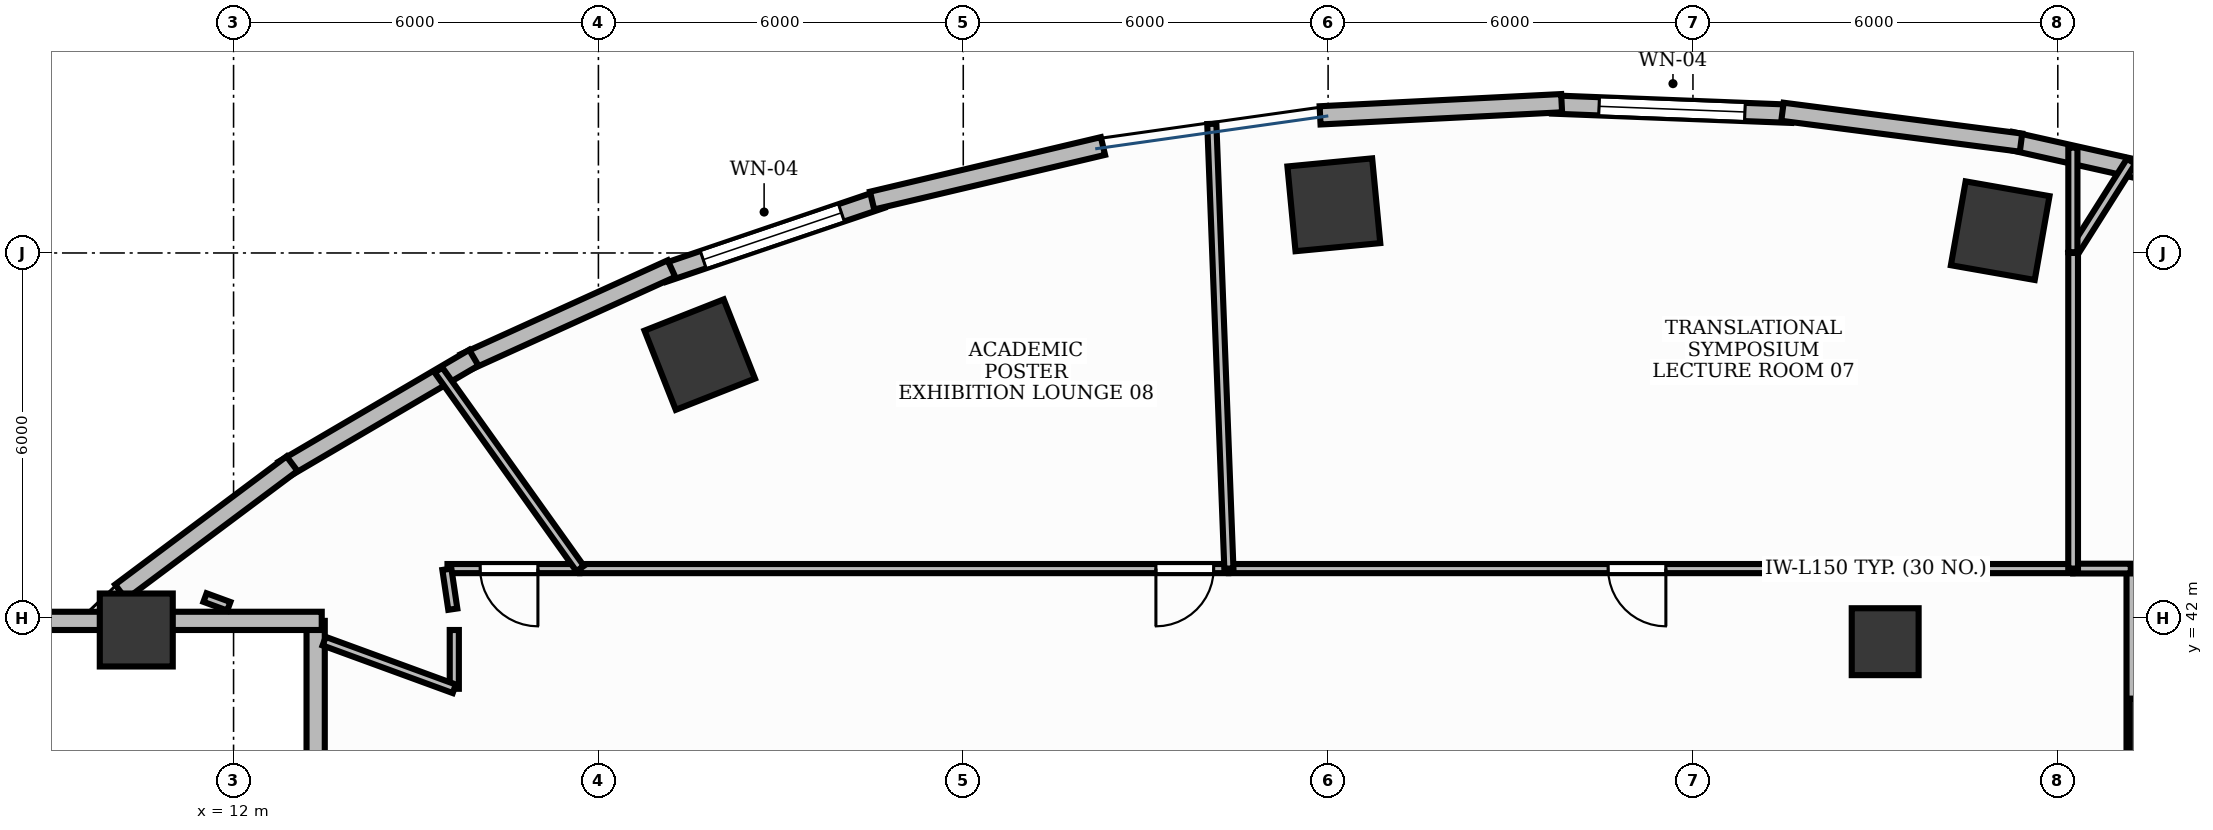
"""IFC4 building model, lengths in metres.
Left out: names, types, materials, properties, quantities, classifications, styles, units other than length and angle.
Written with IfcOpenShell. Run it as: python <this file> out.ifc"""

import sys

from ifc_helpers import new_model, si_unit, direction, frame, frame_2d, origin, origin_2d, place, context, subcontext, project, spatial, rectangle, extrude, element, fill, save


model = new_model("IFC4")
c1 = context("Model", 3, precision=1e-05, world=origin(), true_north=direction((0.0, 1.0)))
c2 = subcontext(c1, "Body", "Model", "MODEL_VIEW")
j1 = project(units=[si_unit("LENGTHUNIT", "METRE"), si_unit("PLANEANGLEUNIT", "RADIAN")], contexts=[c1])
p1 = place(None, origin())
s1 = spatial("IfcSite", under=j1, at=p1, CompositionType="ELEMENT")
p2 = place(p1, origin())
s2 = spatial("IfcBuilding", under=s1, at=p2, CompositionType="ELEMENT")
p3 = place(p2, frame((0.0, 0.0, 15.0)))
s3 = spatial("IfcBuildingStorey", under=s2, at=p3, CompositionType="ELEMENT", Elevation=15.0)
p4 = place(p3, frame((10.4, 41.8, -0.35), z_axis=(0.0, 0.0, 1.0), x_axis=(1.0, 0.0, 0.0)))
e1 = element("IfcColumn", 1, at=p4, inside=s3, PredefinedType="COLUMN", context=c2, shape_type="SweptSolid", body=[
    extrude(rectangle(XDim=1.2, YDim=1.2, at=origin_2d()), origin(), (0.0, 0.0, 1.0), 3.8),
])
p5 = place(p3, frame((43.727, 40.121, -0.0), z_axis=(0.0, 0.0, 1.0), x_axis=(1.0, 0.0, 0.0)))
e2 = element("IfcColumn", 2, at=p5, inside=s3, PredefinedType="COLUMN", context=c2, shape_type="SweptSolid", body=[
    extrude(rectangle(XDim=1.1, YDim=1.1, at=origin_2d()), origin(), (0.0, 0.0, 1.0), 5.051),
])
p6 = place(p3, frame((41.052, 48.367, -0.0), z_axis=(0.0, 0.0, 1.0), x_axis=(-0.984868307662, 0.173304404339, 0.0)))
e3 = element("IfcColumn", 3, at=p6, inside=s3, PredefinedType="COLUMN", context=c2, shape_type="SweptSolid", body=[
    extrude(rectangle(XDim=1.4, YDim=1.4, at=origin_2d()), origin(), (0.0, 0.0, 1.0), 5.051),
])
p7 = place(p3, frame((39.161, 41.608, -0.0), z_axis=(0.0, 0.0, 1.0), x_axis=(1.0, 0.0, 0.0)))
e4 = element("IfcColumn", 4, at=p7, inside=s3, PredefinedType="COLUMN", context=c2, shape_type="SweptSolid", body=[
    extrude(rectangle(XDim=1.1, YDim=1.1, at=origin_2d()), origin(), (0.0, 0.0, 1.0), 5.051),
])
for number, where, z_axis, x_axis in (
    (5, (30.094, 48.792, -0.0), (0.0, 0.0, 1.0), (0.995, 0.095, 0.0)),
    (6, (19.667, 46.329, -0.0), (0.0, 0.0, 1.0), (0.93, 0.367, 0.0)),
):
    element("IfcColumn", number, at=place(p3, frame(where, z_axis=z_axis, x_axis=x_axis)), inside=s3, PredefinedType="COLUMN", context=c2, shape_type="SweptSolid", body=[
        extrude(rectangle(XDim=1.4, YDim=1.4, at=origin_2d()), origin(), (0.0, 0.0, 1.0), 5.051),
    ])
p8 = place(p3, frame((37.623, 50.289, 0.0), z_axis=(0.0, 0.0, 1.0), x_axis=(-0.999247008469, 0.038799691558, 0.0)))
e7 = element("IfcWall", 7, at=p8, inside=s3, PredefinedType="STANDARD", context=c2, shape_type="SweptSolid", body=[
    extrude(rectangle(XDim=3.939, YDim=0.3, at=frame_2d((1.969, 0.0))), origin(), (0.0, 0.0, 1.0), 5.05),
])
p9 = place(p8, frame((0.769, 0.0, 1.5)))
e8 = element("IfcOpeningElement", 8, at=p9, cuts=e7, PredefinedType="OPENING", context=c2, shape_type="SweptSolid", body=[
    extrude(rectangle(XDim=2.4, YDim=1.2, at=frame_2d((1.2, 0.6))), frame((0.0, 0.165, 0.0), z_axis=(0.0, -1.0, 0.0), x_axis=(1.0, 0.0, 0.0)), (0.0, 0.0, 1.0), 0.33),
])
p10 = place(p3, frame((22.655, 48.884, 0.0), z_axis=(0.0, 0.0, 1.0), x_axis=(-0.947034337234, -0.321132315564, 0.0)))
e9 = element("IfcWall", 9, at=p10, inside=s3, PredefinedType="STANDARD", context=c2, shape_type="SweptSolid", body=[
    extrude(rectangle(XDim=3.79, YDim=0.3, at=frame_2d((1.895, 0.0))), origin(), (0.0, 0.0, 1.0), 5.05),
])
p11 = place(p10, frame((0.695, 0.0, 1.5)))
e10 = element("IfcOpeningElement", 10, at=p11, cuts=e9, PredefinedType="OPENING", context=c2, shape_type="SweptSolid", body=[
    extrude(rectangle(XDim=2.4, YDim=1.2, at=frame_2d((1.2, 0.6))), frame((0.0, 0.165, 0.0), z_axis=(0.0, -1.0, 0.0), x_axis=(1.0, 0.0, 0.0)), (0.0, 0.0, 1.0), 0.33),
])
p12 = place(p3, frame((45.04, 48.991, 0.0), z_axis=(0.0, 0.0, 1.0), x_axis=(-0.975868573345, 0.218358713032, 0.0)))
e11 = element("IfcWall", 11, at=p12, inside=s3, PredefinedType="STANDARD", context=c2, shape_type="SweptSolid", body=[
    extrude(rectangle(XDim=3.909, YDim=0.3, at=frame_2d((1.954, 0.0))), origin(), (0.0, 0.0, 1.0), 5.05),
])
p13 = place(p3, frame((41.395, 49.815, 0.0), z_axis=(0.0, 0.0, 1.0), x_axis=(-0.991734095036, 0.128310111617, 0.0)))
e12 = element("IfcWall", 12, at=p13, inside=s3, PredefinedType="STANDARD", context=c2, shape_type="SweptSolid", body=[
    extrude(rectangle(XDim=3.956, YDim=0.3, at=frame_2d((1.978, 0.0))), origin(), (0.0, 0.0, 1.0), 5.05),
])
p14 = place(p3, frame((33.84, 50.463, 0.0), z_axis=(0.0, 0.0, 1.0), x_axis=(-0.998732359232, -0.050335619826, 0.0)))
e13 = element("IfcWall", 13, at=p14, inside=s3, PredefinedType="STANDARD", context=c2, shape_type="SweptSolid", body=[
    extrude(rectangle(XDim=3.977, YDim=0.3, at=frame_2d((1.989, 0.0))), origin(), (0.0, 0.0, 1.0), 5.05),
])
p15 = place(p3, frame((26.297, 49.759, 0.0), z_axis=(0.0, 0.0, 1.0), x_axis=(-0.973197600754, -0.229970497863, 0.0)))
e14 = element("IfcWall", 14, at=p15, inside=s3, PredefinedType="STANDARD", context=c2, shape_type="SweptSolid", body=[
    extrude(rectangle(XDim=3.901, YDim=0.3, at=frame_2d((1.951, 0.0))), origin(), (0.0, 0.0, 1.0), 5.05),
])
p16 = place(p3, frame((19.201, 47.743, 0.0), z_axis=(0.0, 0.0, 1.0), x_axis=(-0.910623406862, -0.413237233166, 0.0)))
e15 = element("IfcWall", 15, at=p16, inside=s3, PredefinedType="STANDARD", context=c2, shape_type="SweptSolid", body=[
    extrude(rectangle(XDim=3.74, YDim=0.3, at=frame_2d((1.87, 0.0))), origin(), (0.0, 0.0, 1.0), 5.05),
])
p17 = place(p3, frame((15.951, 46.278, 0.0), z_axis=(0.0, 0.0, 1.0), x_axis=(-0.8624654944, -0.506115867139, 0.0)))
e16 = element("IfcWall", 16, at=p17, inside=s3, PredefinedType="STANDARD", context=c2, shape_type="SweptSolid", body=[
    extrude(rectangle(XDim=3.635, YDim=0.3, at=frame_2d((1.818, 0.0))), origin(), (0.0, 0.0, 1.0), 5.05),
])
p18 = place(p3, frame((12.961, 44.535, 0.0), z_axis=(0.0, 0.0, 1.0), x_axis=(-0.800823020995, -0.598901067827, 0.0)))
e17 = element("IfcWall", 17, at=p18, inside=s3, PredefinedType="STANDARD", context=c2, shape_type="SweptSolid", body=[
    extrude(rectangle(XDim=3.521, YDim=0.3, at=frame_2d((1.76, 0.0))), origin(), (0.0, 0.0, 1.0), 5.05),
])
p19 = place(p3, frame((13.35, 12.05, 0.0), z_axis=(0.0, 0.0, 1.0), x_axis=(0.0, 1.0, 0.0)))
e18 = element("IfcWall", 18, at=p19, inside=s3, PredefinedType="STANDARD", context=c2, shape_type="SweptSolid", body=[
    extrude(rectangle(XDim=29.9, YDim=0.3, at=frame_2d((14.95, 0.0))), origin(), (0.0, 0.0, 1.0), 1.825),
])
p20 = place(p3, frame((8.6, 41.95, 0.0), z_axis=(0.0, 0.0, 1.0), x_axis=(1.0, 0.0, 0.0)))
e19 = element("IfcWall", 19, at=p20, inside=s3, PredefinedType="STANDARD", context=c2, shape_type="SweptSolid", body=[
    extrude(rectangle(XDim=4.85, YDim=0.3, at=frame_2d((2.425, 0.0))), origin(), (0.0, 0.0, 1.0), 1.825),
])
p21 = place(p3, frame((43.21, 25.001, 0.0), z_axis=(0.0, 0.0, 1.0), x_axis=(0.0, 1.0, 0.0)))
e20 = element("IfcWall", 20, at=p21, inside=s3, PredefinedType="PARTITIONING", context=c2, shape_type="SweptSolid", body=[
    extrude(rectangle(XDim=17.799, YDim=0.16, at=frame_2d((8.899, 0.0))), origin(), (0.0, 0.0, 1.0), 3.36),
])
p22 = place(p21, frame((5.337, 0.0, 0.0)))
e21 = element("IfcOpeningElement", 21, at=p22, cuts=e20, PredefinedType="OPENING", context=c2, shape_type="SweptSolid", body=[
    extrude(rectangle(XDim=0.95, YDim=2.15, at=frame_2d((0.475, 1.075))), frame((0.0, 0.095, 0.0), z_axis=(0.0, -1.0, 0.0), x_axis=(1.0, 0.0, 0.0)), (0.0, 0.0, 1.0), 0.19),
])
p23 = place(p3, frame((42.242, 42.81, 0.0), z_axis=(0.0, 0.0, 1.0), x_axis=(-1.0, 0.0, 0.0)))
e22 = element("IfcWall", 22, at=p23, inside=s3, PredefinedType="PARTITIONING", context=c2, shape_type="SweptSolid", body=[
    extrude(rectangle(XDim=13.874, YDim=0.15, at=frame_2d((6.937, 0.0))), origin(), (0.0, 0.0, 1.0), 3.36),
])
p24 = place(p23, frame((6.688, 0.0, 0.0)))
e23 = element("IfcOpeningElement", 23, at=p24, cuts=e22, PredefinedType="OPENING", context=c2, shape_type="SweptSolid", body=[
    extrude(rectangle(XDim=0.95, YDim=2.15, at=frame_2d((0.475, 1.075))), frame((0.0, 0.09, 0.0), z_axis=(0.0, -1.0, 0.0), x_axis=(1.0, 0.0, 0.0)), (0.0, 0.0, 1.0), 0.18),
])
p25 = place(p3, frame((28.358, 42.81, 0.0), z_axis=(0.0, 0.0, 1.0), x_axis=(-1.0, 0.0, 0.0)))
e24 = element("IfcWall", 24, at=p25, inside=s3, PredefinedType="PARTITIONING", context=c2, shape_type="SweptSolid", body=[
    extrude(rectangle(XDim=10.659, YDim=0.15, at=frame_2d((5.33, 0.0))), origin(), (0.0, 0.0, 1.0), 3.36),
])
p26 = place(p25, frame((0.24, 0.0, 0.0)))
e25 = element("IfcOpeningElement", 25, at=p26, cuts=e24, PredefinedType="OPENING", context=c2, shape_type="SweptSolid", body=[
    extrude(rectangle(XDim=0.95, YDim=2.15, at=frame_2d((0.475, 1.075))), frame((0.0, 0.09, 0.0), z_axis=(0.0, -1.0, 0.0), x_axis=(1.0, 0.0, 0.0)), (0.0, 0.0, 1.0), 0.18),
])
p27 = place(p3, frame((17.687, 42.81, 0.0), z_axis=(0.0, 0.0, 1.0), x_axis=(-1.0, 0.0, 0.0)))
e26 = element("IfcWall", 26, at=p27, inside=s3, PredefinedType="PARTITIONING", context=c2, shape_type="SweptSolid", body=[
    extrude(rectangle(XDim=2.168, YDim=0.15, at=frame_2d((1.084, 0.0))), origin(), (0.0, 0.0, 1.0), 3.36),
])
p28 = place(p27, frame((0.681, 0.0, 0.0)))
e27 = element("IfcOpeningElement", 27, at=p28, cuts=e26, PredefinedType="OPENING", context=c2, shape_type="SweptSolid", body=[
    extrude(rectangle(XDim=0.95, YDim=2.15, at=frame_2d((0.475, 1.075))), frame((0.0, 0.09, 0.0), z_axis=(0.0, -1.0, 0.0), x_axis=(1.0, 0.0, 0.0)), (0.0, 0.0, 1.0), 0.18),
])
p29 = place(p3, frame((42.252, 48.001, 0.0), z_axis=(0.0, 0.0, 1.0), x_axis=(0.534286529928, 0.845303438972, 0.0)))
e28 = element("IfcWall", 28, at=p29, inside=s3, PredefinedType="PARTITIONING", context=c2, shape_type="SweptSolid", body=[
    extrude(rectangle(XDim=1.783, YDim=0.16, at=frame_2d((0.892, 0.0))), origin(), (0.0, 0.0, 1.0), 3.36),
])
p30 = place(p3, frame((43.2, 42.81, 0.0), z_axis=(0.0, 0.0, 1.0), x_axis=(-1.0, 0.0, 0.0)))
e29 = element("IfcWall", 29, at=p30, inside=s3, PredefinedType="PARTITIONING", context=c2, shape_type="SweptSolid", body=[
    extrude(rectangle(XDim=0.948, YDim=0.16, at=frame_2d((0.474, 0.0))), origin(), (0.0, 0.0, 1.0), 3.36),
])
p31 = place(p3, frame((42.252, 42.81, 0.0), z_axis=(0.0, 0.0, 1.0), x_axis=(0.0, 1.0, 0.0)))
e30 = element("IfcWall", 30, at=p31, inside=s3, PredefinedType="PARTITIONING", context=c2, shape_type="SweptSolid", body=[
    extrude(rectangle(XDim=5.19, YDim=0.16, at=frame_2d((2.595, 0.0))), origin(), (0.0, 0.0, 1.0), 3.36),
])
p32 = place(p3, frame((42.248, 49.732, 0.0), z_axis=(0.0, 0.0, 1.0), x_axis=(0.0, -1.0, 0.0)))
e31 = element("IfcWall", 31, at=p32, inside=s3, PredefinedType="PARTITIONING", context=c2, shape_type="SweptSolid", body=[
    extrude(rectangle(XDim=1.719, YDim=0.15, at=frame_2d((0.86, 0.0))), origin(), (0.0, 0.0, 1.0), 3.36),
])
p33 = place(p3, frame((28.368, 42.81, 0.0), z_axis=(0.0, 0.0, 1.0), x_axis=(-0.038361380726, 0.999263931336, 0.0)))
e32 = element("IfcWall", 32, at=p33, inside=s3, PredefinedType="PARTITIONING", context=c2, shape_type="SweptSolid", body=[
    extrude(rectangle(XDim=7.319, YDim=0.15, at=frame_2d((3.659, 0.0))), origin(), (0.0, 0.0, 1.0), 3.36),
])
p34 = place(p3, frame((17.699, 42.81, 0.0), z_axis=(0.0, 0.0, 1.0), x_axis=(-0.58074861972, 0.814082944603, 0.0)))
e33 = element("IfcWall", 33, at=p34, inside=s3, PredefinedType="PARTITIONING", context=c2, shape_type="SweptSolid", body=[
    extrude(rectangle(XDim=4.01, YDim=0.15, at=frame_2d((2.005, 0.0))), origin(), (0.0, 0.0, 1.0), 3.36),
])
p35 = place(p3, frame((11.922, 42.19, 0.0), z_axis=(0.0, 0.0, 1.0), x_axis=(-0.939021389009, 0.343858736961, 0.0)))
e34 = element("IfcWall", 34, at=p35, inside=s3, PredefinedType="PARTITIONING", context=c2, shape_type="SweptSolid", body=[
    extrude(rectangle(XDim=0.417, YDim=0.15, at=frame_2d((0.208, 0.0))), origin(), (0.0, 0.0, 1.0), 3.36),
])
p36 = place(p3, frame((15.508, 42.799, 0.0), z_axis=(0.0, 0.0, 1.0), x_axis=(0.146882189547, -0.989153993266, 0.0)))
e35 = element("IfcWall", 35, at=p36, inside=s3, PredefinedType="PARTITIONING", context=c2, shape_type="SweptSolid", body=[
    extrude(rectangle(XDim=0.663, YDim=0.15, at=frame_2d((0.332, 0.0))), origin(), (0.0, 0.0, 1.0), 3.36),
])
p37 = place(p3, frame((15.63, 41.8, 0.0), z_axis=(0.0, 0.0, 1.0), x_axis=(0.0, -1.0, 0.0)))
e36 = element("IfcWall", 36, at=p37, inside=s3, PredefinedType="PARTITIONING", context=c2, shape_type="SweptSolid", body=[
    extrude(rectangle(XDim=0.967, YDim=0.15, at=frame_2d((0.483, 0.0))), origin(), (0.0, 0.0, 1.0), 3.36),
])
p38 = place(p3, frame((15.63, 40.833, 0.0), z_axis=(0.0, 0.0, 1.0), x_axis=(-0.93911273323, 0.343609188302, 0.0)))
e37 = element("IfcWall", 37, at=p38, inside=s3, PredefinedType="PARTITIONING", context=c2, shape_type="SweptSolid", body=[
    extrude(rectangle(XDim=2.279, YDim=0.15, at=frame_2d((1.139, 0.0))), origin(), (0.0, 0.0, 1.0), 3.36),
])
p39 = place(p9, origin())
e38 = element("IfcWindow", 38, at=p39, inside=s3, PartitioningType="DOUBLE_PANEL_HORIZONTAL", PredefinedType="WINDOW", context=c2, shape_type="SweptSolid", body=[
    extrude(rectangle(XDim=2.4, YDim=1.2, at=frame_2d((1.2, 0.6))), frame((0.0, 0.03, 0.0), z_axis=(0.0, -1.0, 0.0), x_axis=(1.0, 0.0, 0.0)), (0.0, 0.0, 1.0), 0.06),
])
fill(e8, e38)
p40 = place(p11, origin())
e39 = element("IfcWindow", 39, at=p40, inside=s3, PartitioningType="DOUBLE_PANEL_HORIZONTAL", PredefinedType="WINDOW", context=c2, shape_type="SweptSolid", body=[
    extrude(rectangle(XDim=2.4, YDim=1.2, at=frame_2d((1.2, 0.6))), frame((0.0, 0.03, 0.0), z_axis=(0.0, -1.0, 0.0), x_axis=(1.0, 0.0, 0.0)), (0.0, 0.0, 1.0), 0.06),
])
fill(e10, e39)
p41 = place(p24, origin())
e40 = element("IfcDoor", 40, at=p41, inside=s3, OperationType="SINGLE_SWING_LEFT", PredefinedType="DOOR", context=c2, shape_type="SweptSolid", body=[
    extrude(rectangle(XDim=0.95, YDim=2.15, at=frame_2d((0.475, 1.075))), frame((0.0, 0.025, 0.0), z_axis=(0.0, -1.0, 0.0), x_axis=(1.0, 0.0, 0.0)), (0.0, 0.0, 1.0), 0.05),
])
fill(e23, e40)
p42 = place(p26, origin())
e41 = element("IfcDoor", 41, at=p42, inside=s3, OperationType="SINGLE_SWING_RIGHT", PredefinedType="DOOR", context=c2, shape_type="SweptSolid", body=[
    extrude(rectangle(XDim=0.95, YDim=2.15, at=frame_2d((0.475, 1.075))), frame((0.0, 0.025, 0.0), z_axis=(0.0, -1.0, 0.0), x_axis=(1.0, 0.0, 0.0)), (0.0, 0.0, 1.0), 0.05),
])
fill(e25, e41)
p43 = place(p28, origin())
e42 = element("IfcDoor", 42, at=p43, inside=s3, OperationType="SINGLE_SWING_LEFT", PredefinedType="DOOR", context=c2, shape_type="SweptSolid", body=[
    extrude(rectangle(XDim=0.95, YDim=2.15, at=frame_2d((0.475, 1.075))), frame((0.0, 0.025, 0.0), z_axis=(0.0, -1.0, 0.0), x_axis=(1.0, 0.0, 0.0)), (0.0, 0.0, 1.0), 0.05),
])
fill(e27, e42)
save(model, sys.argv[1])
